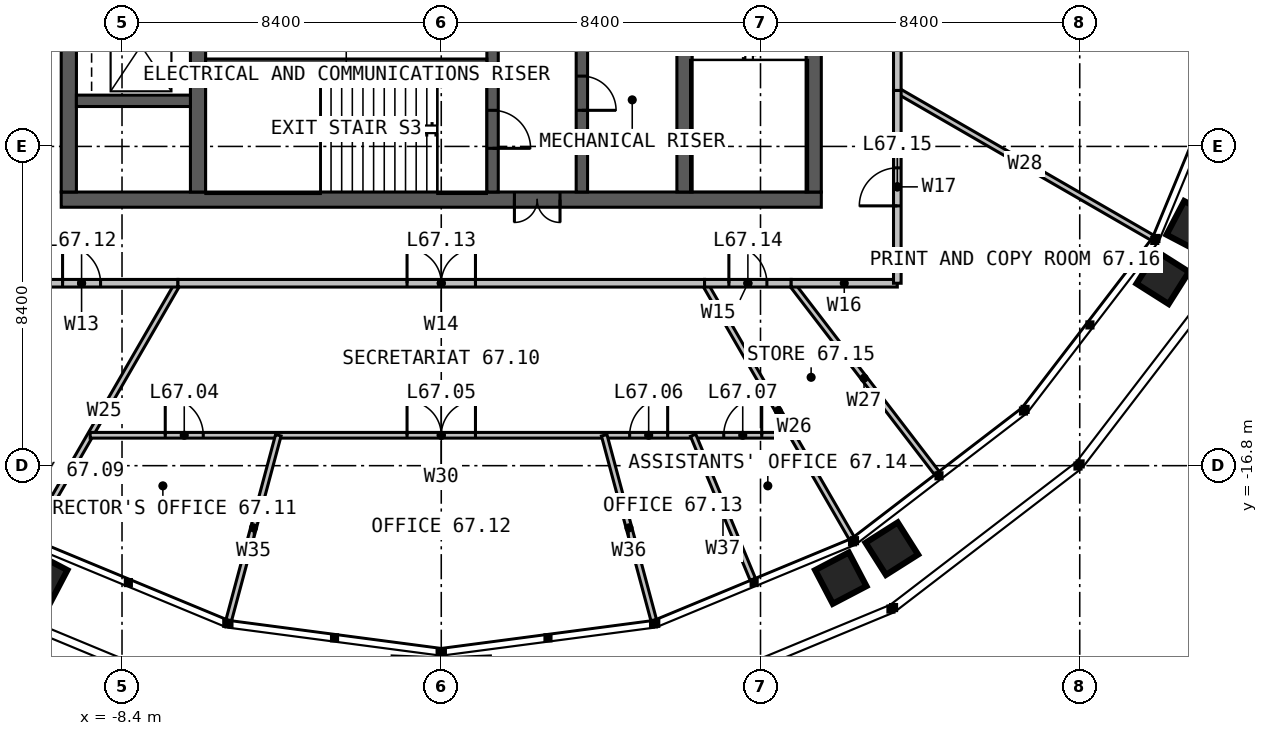
"""IFC4 building model, lengths in metres.
Left out: names, types, materials, properties, quantities, classifications, styles, units other than length and angle.
Written with IfcOpenShell. Run it as: python <this file> out.ifc"""

import sys

from ifc_helpers import new_model, si_unit, direction, frame, frame_2d, origin, place, context, subcontext, project, spatial, rectangle, extrude, element, fill, save


model = new_model("IFC4")
c1 = context("Model", 3, precision=1e-05, world=origin(), true_north=direction((0.0, 1.0)))
c2 = subcontext(c1, "Body", "Model", "MODEL_VIEW")
j1 = project(units=[si_unit("LENGTHUNIT", "METRE"), si_unit("PLANEANGLEUNIT", "RADIAN")], contexts=[c1])
p1 = place(None, origin())
s1 = spatial("IfcSite", under=j1, at=p1, CompositionType="ELEMENT")
p2 = place(p1, origin())
s2 = spatial("IfcBuilding", under=s1, at=p2, CompositionType="ELEMENT")
p3 = place(p2, frame((0.0, 0.0, 276.0)))
s3 = spatial("IfcBuildingStorey", under=s2, at=p3, CompositionType="ELEMENT", Elevation=276.0)
p4 = place(p3, frame((10.0, -9.8, 0.0), z_axis=(0.0, 0.0, 1.0), x_axis=(-1.0, 0.0, 0.0)))
e1 = element("IfcWall", 1, at=p4, inside=s3, PredefinedType="SOLIDWALL", context=c2, shape_type="SweptSolid", body=[
    extrude(rectangle(XDim=20.0, YDim=0.4, at=frame_2d((10.0, 0.0))), origin(), (0.0, 0.0, 1.0), 4.0),
])
p5 = place(p4, frame((6.875, 0.0, 0.0)))
e2 = element("IfcOpeningElement", 2, at=p5, cuts=e1, PredefinedType="OPENING", context=c2, shape_type="SweptSolid", body=[
    extrude(rectangle(XDim=1.2, YDim=2.2, at=frame_2d((0.6, 1.1))), frame((0.0, 0.21, 0.0), z_axis=(0.0, -1.0, 0.0), x_axis=(1.0, 0.0, 0.0)), (0.0, 0.0, 1.0), 0.42),
])
for number, where, z_axis, x_axis in (
    (3, (9.8, -9.6, 0.0), (0.0, 0.0, 1.0), (0.0, 1.0, 0.0)),
    (4, (-9.8, 9.6, 0.0), (0.0, 0.0, 1.0), (0.0, -1.0, 0.0)),
):
    element("IfcWall", number, at=place(p3, frame(where, z_axis=z_axis, x_axis=x_axis)), inside=s3, PredefinedType="SOLIDWALL", context=c2, shape_type="SweptSolid", body=[
        extrude(rectangle(XDim=19.2, YDim=0.4, at=frame_2d((9.6, 0.0))), origin(), (0.0, 0.0, 1.0), 4.0),
    ])
p6 = place(p3, frame((-6.4, -9.6, 0.0), z_axis=(0.0, 0.0, 1.0), x_axis=(0.0, 1.0, 0.0)))
e5 = element("IfcWall", 5, at=p6, inside=s3, PredefinedType="SOLIDWALL", context=c2, shape_type="SweptSolid", body=[
    extrude(rectangle(XDim=19.2, YDim=0.4, at=frame_2d((9.6, 0.0))), origin(), (0.0, 0.0, 1.0), 4.0),
])
p7 = place(p6, frame((9.1, 0.0, 0.0)))
e6 = element("IfcOpeningElement", 6, at=p7, cuts=e5, PredefinedType="OPENING", context=c2, shape_type="SweptSolid", body=[
    extrude(rectangle(XDim=1.0, YDim=2.2, at=frame_2d((0.5, 1.1))), frame((0.0, 0.21, 0.0), z_axis=(0.0, -1.0, 0.0), x_axis=(1.0, 0.0, 0.0)), (0.0, 0.0, 1.0), 0.42),
])
p8 = place(p3, frame((6.4, 9.6, 0.0), z_axis=(0.0, 0.0, 1.0), x_axis=(0.0, -1.0, 0.0)))
e7 = element("IfcWall", 7, at=p8, inside=s3, PredefinedType="SOLIDWALL", context=c2, shape_type="SweptSolid", body=[
    extrude(rectangle(XDim=19.2, YDim=0.4, at=frame_2d((9.6, 0.0))), origin(), (0.0, 0.0, 1.0), 4.0),
])
p9 = place(p8, frame((9.1, 0.0, 0.0)))
e8 = element("IfcOpeningElement", 8, at=p9, cuts=e7, PredefinedType="OPENING", context=c2, shape_type="SweptSolid", body=[
    extrude(rectangle(XDim=1.0, YDim=2.2, at=frame_2d((0.5, 1.1))), frame((0.0, 0.21, 0.0), z_axis=(0.0, -1.0, 0.0), x_axis=(1.0, 0.0, 0.0)), (0.0, 0.0, 1.0), 0.42),
])
p10 = place(p3, frame((1.35, -1.45, 0.0), z_axis=(0.0, 0.0, 1.0), x_axis=(0.0, -1.0, 0.0)))
e9 = element("IfcWall", 9, at=p10, inside=s3, PredefinedType="SOLIDWALL", context=c2, shape_type="SweptSolid", body=[
    extrude(rectangle(XDim=8.15, YDim=0.3, at=frame_2d((4.075, 0.0))), origin(), (0.0, 0.0, 1.0), 4.0),
])
p11 = place(p10, frame((6.0, 0.0, 0.0)))
e10 = element("IfcOpeningElement", 10, at=p11, cuts=e9, PredefinedType="OPENING", context=c2, shape_type="SweptSolid", body=[
    extrude(rectangle(XDim=1.0, YDim=2.2, at=frame_2d((0.5, 1.1))), frame((0.0, 0.16, 0.0), z_axis=(0.0, -1.0, 0.0), x_axis=(1.0, 0.0, 0.0)), (0.0, 0.0, 1.0), 0.32),
])
p12 = place(p10, frame((3.525, 0.0, 0.0)))
e11 = element("IfcOpeningElement", 11, at=p12, cuts=e9, PredefinedType="OPENING", context=c2, shape_type="SweptSolid", body=[
    extrude(rectangle(XDim=0.9, YDim=2.2, at=frame_2d((0.45, 1.1))), frame((0.0, 0.16, 0.0), z_axis=(0.0, -1.0, 0.0), x_axis=(1.0, 0.0, 0.0)), (0.0, 0.0, 1.0), 0.32),
])
p13 = place(p3, frame((3.7, -1.45, 0.0), z_axis=(0.0, 0.0, 1.0), x_axis=(0.0, -1.0, 0.0)))
e12 = element("IfcWall", 12, at=p13, inside=s3, PredefinedType="SOLIDWALL", context=c2, shape_type="SweptSolid", body=[
    extrude(rectangle(XDim=8.15, YDim=0.3, at=frame_2d((4.075, 0.0))), origin(), (0.0, 0.0, 1.0), 4.0),
])
p14 = place(p13, frame((5.1, 0.0, 0.0)))
e13 = element("IfcOpeningElement", 13, at=p14, cuts=e12, PredefinedType="OPENING", context=c2, shape_type="SweptSolid", body=[
    extrude(rectangle(XDim=0.9, YDim=2.2, at=frame_2d((0.45, 1.1))), frame((0.0, 0.16, 0.0), z_axis=(0.0, -1.0, 0.0), x_axis=(1.0, 0.0, 0.0)), (0.0, 0.0, 1.0), 0.32),
])
p15 = place(p3, frame((-6.2, -6.2, 0.0), z_axis=(0.0, 0.0, 1.0), x_axis=(1.0, 0.0, 0.0)))
e14 = element("IfcWall", 14, at=p15, inside=s3, PredefinedType="SOLIDWALL", context=c2, shape_type="SweptSolid", body=[
    extrude(rectangle(XDim=7.4, YDim=0.2, at=frame_2d((3.7, 0.0))), origin(), (0.0, 0.0, 1.0), 4.0),
])
p16 = place(p3, frame((-9.6, -7.2, 0.0), z_axis=(0.0, 0.0, 1.0), x_axis=(1.0, 0.0, 0.0)))
e15 = element("IfcWall", 15, at=p16, inside=s3, PredefinedType="SOLIDWALL", context=c2, shape_type="SweptSolid", body=[
    extrude(rectangle(XDim=3.0, YDim=0.3, at=frame_2d((1.5, 0.0))), origin(), (0.0, 0.0, 1.0), 4.0),
])
for number, where, z_axis, x_axis in (
    (16, (12.0, -6.928, 0.0), (0.0, 0.0, 1.0), (0.866, -0.5, 0.0)),
    (17, (-6.928, -12.0, 0.0), (0.0, 0.0, 1.0), (-0.5, -0.866, 0.0)),
    (18, (6.928, -12.0, 0.0), (0.0, 0.0, 1.0), (0.5, -0.866, 0.0)),
):
    element("IfcWall", number, at=place(p3, frame(where, z_axis=z_axis, x_axis=x_axis)), inside=s3, PredefinedType="PARTITIONING", context=c2, shape_type="SweptSolid", body=[
        extrude(rectangle(XDim=7.752, YDim=0.15, at=frame_2d((3.876, 0.0))), origin(), (0.0, 0.0, 1.0), 2.79),
    ])
p17 = place(p3, frame((9.208, -12.0, 0.0), z_axis=(0.0, 0.0, 1.0), x_axis=(0.608752966797, -0.793359833503, 0.0)))
e19 = element("IfcWall", 19, at=p17, inside=s3, PredefinedType="PARTITIONING", context=c2, shape_type="SweptSolid", body=[
    extrude(rectangle(XDim=6.298, YDim=0.15, at=frame_2d((3.149, 0.0))), origin(), (0.0, 0.0, 1.0), 2.79),
])
p18 = place(p3, frame((12.0, -6.928, 0.0), z_axis=(0.0, 0.0, 1.0), x_axis=(0.0, 1.0, 0.0)))
e20 = element("IfcWall", 20, at=p18, inside=s3, PredefinedType="PARTITIONING", context=c2, shape_type="SweptSolid", body=[
    extrude(rectangle(XDim=10.144, YDim=0.2, at=frame_2d((5.072, 0.0))), origin(), (0.0, 0.0, 1.0), 3.8),
])
p19 = place(p18, frame((4.172, 0.0, 0.0)))
e21 = element("IfcOpeningElement", 21, at=p19, cuts=e20, PredefinedType="OPENING", context=c2, shape_type="SweptSolid", body=[
    extrude(rectangle(XDim=1.8, YDim=2.2, at=frame_2d((0.9, 1.1))), frame((0.0, 0.11, 0.0), z_axis=(0.0, -1.0, 0.0), x_axis=(1.0, 0.0, 0.0)), (0.0, 0.0, 1.0), 0.22),
])
p20 = place(p3, frame((-12.0, -12.0, 0.0), z_axis=(0.0, 0.0, 1.0), x_axis=(1.0, 0.0, 0.0)))
e22 = element("IfcWall", 22, at=p20, inside=s3, PredefinedType="PARTITIONING", context=c2, shape_type="SweptSolid", body=[
    extrude(rectangle(XDim=5.072, YDim=0.2, at=frame_2d((2.536, 0.0))), origin(), (0.0, 0.0, 1.0), 3.8),
])
p21 = place(p20, frame((2.036, 0.0, 0.0)))
e23 = element("IfcOpeningElement", 23, at=p21, cuts=e22, PredefinedType="OPENING", context=c2, shape_type="SweptSolid", body=[
    extrude(rectangle(XDim=1.0, YDim=2.2, at=frame_2d((0.5, 1.1))), frame((0.0, 0.11, 0.0), z_axis=(0.0, -1.0, 0.0), x_axis=(1.0, 0.0, 0.0)), (0.0, 0.0, 1.0), 0.22),
])
p22 = place(p3, frame((-9.238, -16.0, 0.0), z_axis=(0.0, 0.0, 1.0), x_axis=(1.0, 0.0, 0.0)))
e24 = element("IfcWall", 24, at=p22, inside=s3, PredefinedType="PARTITIONING", context=c2, shape_type="SweptSolid", body=[
    extrude(rectangle(XDim=18.475, YDim=0.15, at=frame_2d((9.238, 0.0))), origin(), (0.0, 0.0, 1.0), 2.79),
])
p23 = place(p22, frame((1.975, 0.0, 0.0)))
e25 = element("IfcOpeningElement", 25, at=p23, cuts=e24, PredefinedType="OPENING", context=c2, shape_type="SweptSolid", body=[
    extrude(rectangle(XDim=1.0, YDim=2.2, at=frame_2d((0.5, 1.1))), frame((0.0, 0.085, 0.0), z_axis=(0.0, -1.0, 0.0), x_axis=(1.0, 0.0, 0.0)), (0.0, 0.0, 1.0), 0.17),
])
p24 = place(p22, frame((8.338, 0.0, 0.0)))
e26 = element("IfcOpeningElement", 26, at=p24, cuts=e24, PredefinedType="OPENING", context=c2, shape_type="SweptSolid", body=[
    extrude(rectangle(XDim=1.8, YDim=2.2, at=frame_2d((0.9, 1.1))), frame((0.0, 0.085, 0.0), z_axis=(0.0, -1.0, 0.0), x_axis=(1.0, 0.0, 0.0)), (0.0, 0.0, 1.0), 0.17),
])
p25 = place(p22, frame((14.195, 0.0, 0.0)))
e27 = element("IfcOpeningElement", 27, at=p25, cuts=e24, PredefinedType="OPENING", context=c2, shape_type="SweptSolid", body=[
    extrude(rectangle(XDim=1.0, YDim=2.2, at=frame_2d((0.5, 1.1))), frame((0.0, 0.085, 0.0), z_axis=(0.0, -1.0, 0.0), x_axis=(1.0, 0.0, 0.0)), (0.0, 0.0, 1.0), 0.17),
])
p26 = place(p22, frame((16.67, 0.0, 0.0)))
e28 = element("IfcOpeningElement", 28, at=p26, cuts=e24, PredefinedType="OPENING", context=c2, shape_type="SweptSolid", body=[
    extrude(rectangle(XDim=1.0, YDim=2.2, at=frame_2d((0.5, 1.1))), frame((0.0, 0.085, 0.0), z_axis=(0.0, -1.0, 0.0), x_axis=(1.0, 0.0, 0.0)), (0.0, 0.0, 1.0), 0.17),
])
for number, where, z_axis, x_axis in (
    (29, (-4.287, -16.0, 0.0), (0.0, 0.0, 1.0), (-0.259, -0.966, 0.0)),
    (30, (4.287, -16.0, 0.0), (0.0, 0.0, 1.0), (0.259, -0.966, 0.0)),
):
    element("IfcWall", number, at=place(p3, frame(where, z_axis=z_axis, x_axis=x_axis)), inside=s3, PredefinedType="PARTITIONING", context=c2, shape_type="SweptSolid", body=[
        extrude(rectangle(XDim=5.044, YDim=0.15, at=frame_2d((2.522, 0.0))), origin(), (0.0, 0.0, 1.0), 2.79),
    ])
p27 = place(p3, frame((6.627, -16.0, 0.0), z_axis=(0.0, 0.0, 1.0), x_axis=(0.382693194178, -0.923875488976, 0.0)))
e31 = element("IfcWall", 31, at=p27, inside=s3, PredefinedType="PARTITIONING", context=c2, shape_type="SweptSolid", body=[
    extrude(rectangle(XDim=4.105, YDim=0.15, at=frame_2d((2.053, 0.0))), origin(), (0.0, 0.0, 1.0), 2.79),
])
p28 = place(p3, frame((-6.928, -12.0, 0.0), z_axis=(0.0, 0.0, 1.0), x_axis=(1.0, 0.0, 0.0)))
e32 = element("IfcWall", 32, at=p28, inside=s3, PredefinedType="PARTITIONING", context=c2, shape_type="SweptSolid", body=[
    extrude(rectangle(XDim=13.856, YDim=0.2, at=frame_2d((6.928, 0.0))), origin(), (0.0, 0.0, 1.0), 3.8),
])
p29 = place(p28, frame((6.028, 0.0, 0.0)))
e33 = element("IfcOpeningElement", 33, at=p29, cuts=e32, PredefinedType="OPENING", context=c2, shape_type="SweptSolid", body=[
    extrude(rectangle(XDim=1.8, YDim=2.2, at=frame_2d((0.9, 1.1))), frame((0.0, 0.11, 0.0), z_axis=(0.0, -1.0, 0.0), x_axis=(1.0, 0.0, 0.0)), (0.0, 0.0, 1.0), 0.22),
])
p30 = place(p3, frame((6.928, -12.0, 0.0), z_axis=(0.0, 0.0, 1.0), x_axis=(1.0, 0.0, 0.0)))
e34 = element("IfcWall", 34, at=p30, inside=s3, PredefinedType="PARTITIONING", context=c2, shape_type="SweptSolid", body=[
    extrude(rectangle(XDim=2.28, YDim=0.2, at=frame_2d((1.14, 0.0))), origin(), (0.0, 0.0, 1.0), 3.8),
])
p31 = place(p30, frame((0.64, 0.0, 0.0)))
e35 = element("IfcOpeningElement", 35, at=p31, cuts=e34, PredefinedType="OPENING", context=c2, shape_type="SweptSolid", body=[
    extrude(rectangle(XDim=1.0, YDim=2.2, at=frame_2d((0.5, 1.1))), frame((0.0, 0.11, 0.0), z_axis=(0.0, -1.0, 0.0), x_axis=(1.0, 0.0, 0.0)), (0.0, 0.0, 1.0), 0.22),
])
p32 = place(p3, frame((9.208, -12.0, 0.0), z_axis=(0.0, 0.0, 1.0), x_axis=(1.0, 0.0, 0.0)))
e36 = element("IfcWall", 36, at=p32, inside=s3, PredefinedType="PARTITIONING", context=c2, shape_type="SweptSolid", body=[
    extrude(rectangle(XDim=2.792, YDim=0.2, at=frame_2d((1.396, 0.0))), origin(), (0.0, 0.0, 1.0), 3.8),
])
p33 = place(p3, frame((12.0, -12.0, 0.0), z_axis=(0.0, 0.0, 1.0), x_axis=(0.0, 1.0, 0.0)))
e37 = element("IfcWall", 37, at=p33, inside=s3, PredefinedType="PARTITIONING", context=c2, shape_type="SweptSolid", body=[
    extrude(rectangle(XDim=5.072, YDim=0.2, at=frame_2d((2.536, 0.0))), origin(), (0.0, 0.0, 1.0), 3.8),
])
p34 = place(p33, frame((2.036, 0.0, 0.0)))
e38 = element("IfcOpeningElement", 38, at=p34, cuts=e37, PredefinedType="OPENING", context=c2, shape_type="SweptSolid", body=[
    extrude(rectangle(XDim=1.0, YDim=2.2, at=frame_2d((0.5, 1.1))), frame((0.0, 0.11, 0.0), z_axis=(0.0, -1.0, 0.0), x_axis=(1.0, 0.0, 0.0)), (0.0, 0.0, 1.0), 0.22),
])
p35 = place(p5, origin())
e39 = element("IfcDoor", 39, at=p35, inside=s3, OperationType="DOUBLE_DOOR_SINGLE_SWING", PredefinedType="DOOR", context=c2, shape_type="SweptSolid", body=[
    extrude(rectangle(XDim=1.2, YDim=2.2, at=frame_2d((0.6, 1.1))), frame((0.0, 0.025, 0.0), z_axis=(0.0, -1.0, 0.0), x_axis=(1.0, 0.0, 0.0)), (0.0, 0.0, 1.0), 0.05),
])
fill(e2, e39)
p36 = place(p11, origin())
e40 = element("IfcDoor", 40, at=p36, inside=s3, OperationType="SINGLE_SWING_RIGHT", PredefinedType="DOOR", context=c2, shape_type="SweptSolid", body=[
    extrude(rectangle(XDim=1.0, YDim=2.2, at=frame_2d((0.5, 1.1))), frame((0.0, 0.025, 0.0), z_axis=(0.0, -1.0, 0.0), x_axis=(1.0, 0.0, 0.0)), (0.0, 0.0, 1.0), 0.05),
])
fill(e10, e40)
p37 = place(p14, origin())
e41 = element("IfcDoor", 41, at=p37, inside=s3, OperationType="SINGLE_SWING_RIGHT", PredefinedType="DOOR", context=c2, shape_type="SweptSolid", body=[
    extrude(rectangle(XDim=0.9, YDim=2.2, at=frame_2d((0.45, 1.1))), frame((0.0, 0.025, 0.0), z_axis=(0.0, -1.0, 0.0), x_axis=(1.0, 0.0, 0.0)), (0.0, 0.0, 1.0), 0.05),
])
fill(e13, e41)
p38 = place(p21, origin())
e42 = element("IfcDoor", 42, at=p38, inside=s3, OperationType="SINGLE_SWING_LEFT", PredefinedType="DOOR", context=c2, shape_type="SweptSolid", body=[
    extrude(rectangle(XDim=1.0, YDim=2.2, at=frame_2d((0.5, 1.1))), frame((0.0, 0.025, 0.0), z_axis=(0.0, -1.0, 0.0), x_axis=(1.0, 0.0, 0.0)), (0.0, 0.0, 1.0), 0.05),
])
fill(e23, e42)
p39 = place(p23, origin())
e43 = element("IfcDoor", 43, at=p39, inside=s3, OperationType="SINGLE_SWING_LEFT", PredefinedType="DOOR", context=c2, shape_type="SweptSolid", body=[
    extrude(rectangle(XDim=1.0, YDim=2.2, at=frame_2d((0.5, 1.1))), frame((0.0, 0.025, 0.0), z_axis=(0.0, -1.0, 0.0), x_axis=(1.0, 0.0, 0.0)), (0.0, 0.0, 1.0), 0.05),
])
fill(e25, e43)
p40 = place(p24, origin())
e44 = element("IfcDoor", 44, at=p40, inside=s3, OperationType="DOUBLE_DOOR_SINGLE_SWING", PredefinedType="DOOR", context=c2, shape_type="SweptSolid", body=[
    extrude(rectangle(XDim=1.8, YDim=2.2, at=frame_2d((0.9, 1.1))), frame((0.0, 0.025, 0.0), z_axis=(0.0, -1.0, 0.0), x_axis=(1.0, 0.0, 0.0)), (0.0, 0.0, 1.0), 0.05),
])
fill(e26, e44)
p41 = place(p25, origin())
e45 = element("IfcDoor", 45, at=p41, inside=s3, OperationType="SINGLE_SWING_RIGHT", PredefinedType="DOOR", context=c2, shape_type="SweptSolid", body=[
    extrude(rectangle(XDim=1.0, YDim=2.2, at=frame_2d((0.5, 1.1))), frame((0.0, 0.025, 0.0), z_axis=(0.0, -1.0, 0.0), x_axis=(1.0, 0.0, 0.0)), (0.0, 0.0, 1.0), 0.05),
])
fill(e27, e45)
p42 = place(p26, origin())
e46 = element("IfcDoor", 46, at=p42, inside=s3, OperationType="SINGLE_SWING_RIGHT", PredefinedType="DOOR", context=c2, shape_type="SweptSolid", body=[
    extrude(rectangle(XDim=1.0, YDim=2.2, at=frame_2d((0.5, 1.1))), frame((0.0, 0.025, 0.0), z_axis=(0.0, -1.0, 0.0), x_axis=(1.0, 0.0, 0.0)), (0.0, 0.0, 1.0), 0.05),
])
fill(e28, e46)
p43 = place(p29, origin())
e47 = element("IfcDoor", 47, at=p43, inside=s3, OperationType="DOUBLE_DOOR_SINGLE_SWING", PredefinedType="DOOR", context=c2, shape_type="SweptSolid", body=[
    extrude(rectangle(XDim=1.8, YDim=2.2, at=frame_2d((0.9, 1.1))), frame((0.0, 0.025, 0.0), z_axis=(0.0, -1.0, 0.0), x_axis=(1.0, 0.0, 0.0)), (0.0, 0.0, 1.0), 0.05),
])
fill(e33, e47)
p44 = place(p31, origin())
e48 = element("IfcDoor", 48, at=p44, inside=s3, OperationType="SINGLE_SWING_LEFT", PredefinedType="DOOR", context=c2, shape_type="SweptSolid", body=[
    extrude(rectangle(XDim=1.0, YDim=2.2, at=frame_2d((0.5, 1.1))), frame((0.0, 0.025, 0.0), z_axis=(0.0, -1.0, 0.0), x_axis=(1.0, 0.0, 0.0)), (0.0, 0.0, 1.0), 0.05),
])
fill(e35, e48)
p45 = place(p34, origin())
e49 = element("IfcDoor", 49, at=p45, inside=s3, OperationType="SINGLE_SWING_LEFT", PredefinedType="DOOR", context=c2, shape_type="SweptSolid", body=[
    extrude(rectangle(XDim=1.0, YDim=2.2, at=frame_2d((0.5, 1.1))), frame((0.0, 0.025, 0.0), z_axis=(0.0, -1.0, 0.0), x_axis=(1.0, 0.0, 0.0)), (0.0, 0.0, 1.0), 0.05),
])
fill(e38, e49)
save(model, sys.argv[1])
